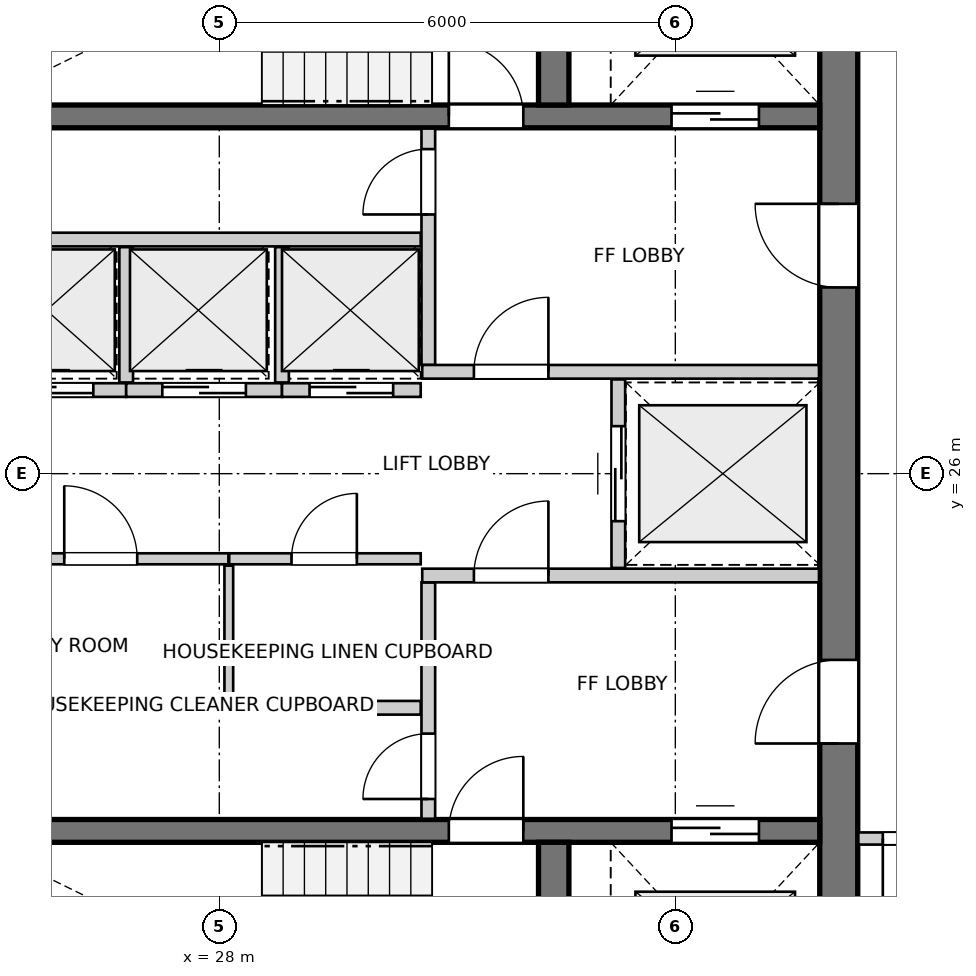
"""IFC4 building model, lengths in metres.
Left out: names, types, materials, properties, quantities, classifications, styles, units other than length and angle.
Written with IfcOpenShell. Run it as: python <this file> out.ifc"""

import sys

from ifc_helpers import new_model, si_unit, direction, frame, frame_2d, origin, place, context, subcontext, project, spatial, rectangle, extrude, source, transform, mapped, element, fill, save


model = new_model("IFC4")
c1 = context("Model", 3, precision=1e-05, world=origin(), true_north=direction((0.0, 1.0)))
c2 = subcontext(c1, "Body", "Model", "MODEL_VIEW")
j1 = project(units=[si_unit("LENGTHUNIT", "METRE"), si_unit("PLANEANGLEUNIT", "RADIAN")], contexts=[c1])
p1 = place(None, origin())
s1 = spatial("IfcSite", under=j1, at=p1, CompositionType="ELEMENT")
p2 = place(p1, origin())
s2 = spatial("IfcBuilding", under=s1, at=p2, CompositionType="ELEMENT")
p3 = place(p2, frame((0.0, 0.0, 224.4)))
s3 = spatial("IfcBuildingStorey", under=s2, at=p3, CompositionType="ELEMENT", Elevation=224.4)
p4 = place(p3, frame((36.15, 18.2, 0.0), z_axis=(0.0, 0.0, 1.0), x_axis=(0.0, 1.0, 0.0)))
e1 = element("IfcWall", 1, at=p4, inside=s3, PredefinedType="SHEAR", context=c2, shape_type="SweptSolid", body=[
    extrude(rectangle(XDim=15.6, YDim=0.5, at=frame_2d((7.8, 0.0))), origin(), (0.0, 0.0, 1.0), 2.96),
])
p5 = place(p4, frame((4.25, 0.0, 0.0)))
e2 = element("IfcOpeningElement", 2, at=p5, cuts=e1, PredefinedType="OPENING", context=c2, shape_type="SweptSolid", body=[
    extrude(rectangle(XDim=1.1, YDim=2.15, at=frame_2d((0.55, 1.075))), frame((0.0, 0.26, 0.0), z_axis=(0.0, -1.0, 0.0), x_axis=(1.0, 0.0, 0.0)), (0.0, 0.0, 1.0), 0.52),
])
p6 = place(p4, frame((10.25, 0.0, 0.0)))
e3 = element("IfcOpeningElement", 3, at=p6, cuts=e1, PredefinedType="OPENING", context=c2, shape_type="SweptSolid", body=[
    extrude(rectangle(XDim=1.1, YDim=2.15, at=frame_2d((0.55, 1.075))), frame((0.0, 0.26, 0.0), z_axis=(0.0, -1.0, 0.0), x_axis=(1.0, 0.0, 0.0)), (0.0, 0.0, 1.0), 0.52),
])
p7 = place(p3, frame((24.8, 21.3, 0.0), z_axis=(0.0, 0.0, 1.0), x_axis=(1.0, 0.0, 0.0)))
e4 = element("IfcWall", 4, at=p7, inside=s3, PredefinedType="SHEAR", context=c2, shape_type="SweptSolid", body=[
    extrude(rectangle(XDim=11.1, YDim=0.3, at=frame_2d((5.55, 0.0))), origin(), (0.0, 0.0, 1.0), 2.96),
])
p8 = place(p7, frame((6.22, 0.0, 0.0)))
e5 = element("IfcOpeningElement", 5, at=p8, cuts=e4, PredefinedType="OPENING", context=c2, shape_type="SweptSolid", body=[
    extrude(rectangle(XDim=0.98, YDim=2.15, at=frame_2d((0.49, 1.075))), frame((0.0, 0.16, 0.0), z_axis=(0.0, -1.0, 0.0), x_axis=(1.0, 0.0, 0.0)), (0.0, 0.0, 1.0), 0.32),
])
p9 = place(p7, frame((9.15, 0.0, 0.0)))
e6 = element("IfcOpeningElement", 6, at=p9, cuts=e4, PredefinedType="OPENING", context=c2, shape_type="SweptSolid", body=[
    extrude(rectangle(XDim=1.15, YDim=2.15, at=frame_2d((0.575, 1.075))), frame((0.0, 0.16, 0.0), z_axis=(0.0, -1.0, 0.0), x_axis=(1.0, 0.0, 0.0)), (0.0, 0.0, 1.0), 0.32),
])
p10 = place(p3, frame((32.4, 18.2, 0.0), z_axis=(0.0, 0.0, 1.0), x_axis=(0.0, 1.0, 0.0)))
e7 = element("IfcWall", 7, at=p10, inside=s3, PredefinedType="SHEAR", context=c2, shape_type="SweptSolid", body=[
    extrude(rectangle(XDim=2.95, YDim=0.4, at=frame_2d((1.475, 0.0))), origin(), (0.0, 0.0, 1.0), 2.96),
])
p11 = place(p3, frame((24.8, 30.7, 0.0), z_axis=(0.0, 0.0, 1.0), x_axis=(1.0, 0.0, 0.0)))
e8 = element("IfcWall", 8, at=p11, inside=s3, PredefinedType="SHEAR", context=c2, shape_type="SweptSolid", body=[
    extrude(rectangle(XDim=11.1, YDim=0.3, at=frame_2d((5.55, 0.0))), origin(), (0.0, 0.0, 1.0), 2.96),
])
p12 = place(p11, frame((6.22, 0.0, 0.0)))
e9 = element("IfcOpeningElement", 9, at=p12, cuts=e8, PredefinedType="OPENING", context=c2, shape_type="SweptSolid", body=[
    extrude(rectangle(XDim=0.98, YDim=2.15, at=frame_2d((0.49, 1.075))), frame((0.0, 0.16, 0.0), z_axis=(0.0, -1.0, 0.0), x_axis=(1.0, 0.0, 0.0)), (0.0, 0.0, 1.0), 0.32),
])
p13 = place(p11, frame((9.15, 0.0, 0.0)))
e10 = element("IfcOpeningElement", 10, at=p13, cuts=e8, PredefinedType="OPENING", context=c2, shape_type="SweptSolid", body=[
    extrude(rectangle(XDim=1.15, YDim=2.15, at=frame_2d((0.575, 1.075))), frame((0.0, 0.16, 0.0), z_axis=(0.0, -1.0, 0.0), x_axis=(1.0, 0.0, 0.0)), (0.0, 0.0, 1.0), 0.32),
])
p14 = place(p3, frame((32.4, 30.85, 0.0), z_axis=(0.0, 0.0, 1.0), x_axis=(0.0, 1.0, 0.0)))
e11 = element("IfcWall", 11, at=p14, inside=s3, PredefinedType="SHEAR", context=c2, shape_type="SweptSolid", body=[
    extrude(rectangle(XDim=2.95, YDim=0.4, at=frame_2d((1.475, 0.0))), origin(), (0.0, 0.0, 1.0), 2.96),
])
p15 = place(p3, frame((30.75, 21.46, 0.0), z_axis=(0.0, 0.0, 1.0), x_axis=(0.0, 1.0, 0.0)))
e12 = element("IfcWall", 12, at=p15, inside=s3, PredefinedType="PARTITIONING", context=c2, shape_type="SweptSolid", body=[
    extrude(rectangle(XDim=3.11, YDim=0.18, at=frame_2d((1.555, 0.0))), origin(), (0.0, 0.0, 1.0), 2.96),
])
p16 = place(p15, frame((0.26, 0.0, 0.0)))
e13 = element("IfcOpeningElement", 13, at=p16, cuts=e12, PredefinedType="OPENING", context=c2, shape_type="SweptSolid", body=[
    extrude(rectangle(XDim=0.86, YDim=2.05, at=frame_2d((0.43, 1.025))), frame((0.0, 0.1, 0.0), z_axis=(0.0, -1.0, 0.0), x_axis=(1.0, 0.0, 0.0)), (0.0, 0.0, 1.0), 0.2),
])
p17 = place(p3, frame((30.67, 24.66, 0.0), z_axis=(0.0, 0.0, 1.0), x_axis=(1.0, 0.0, 0.0)))
e14 = element("IfcWall", 14, at=p17, inside=s3, PredefinedType="PARTITIONING", context=c2, shape_type="SweptSolid", body=[
    extrude(rectangle(XDim=5.22, YDim=0.18, at=frame_2d((2.61, 0.0))), origin(), (0.0, 0.0, 1.0), 2.96),
])
p18 = place(p17, frame((0.68, 0.0, 0.0)))
e15 = element("IfcOpeningElement", 15, at=p18, cuts=e14, PredefinedType="OPENING", context=c2, shape_type="SweptSolid", body=[
    extrude(rectangle(XDim=0.98, YDim=2.15, at=frame_2d((0.49, 1.075))), frame((0.0, 0.1, 0.0), z_axis=(0.0, -1.0, 0.0), x_axis=(1.0, 0.0, 0.0)), (0.0, 0.0, 1.0), 0.2),
])
p19 = place(p3, frame((30.75, 27.43, 0.0), z_axis=(0.0, 0.0, 1.0), x_axis=(0.0, 1.0, 0.0)))
e16 = element("IfcWall", 16, at=p19, inside=s3, PredefinedType="PARTITIONING", context=c2, shape_type="SweptSolid", body=[
    extrude(rectangle(XDim=3.11, YDim=0.18, at=frame_2d((1.555, 0.0))), origin(), (0.0, 0.0, 1.0), 2.96),
])
p20 = place(p19, frame((1.98, 0.0, 0.0)))
e17 = element("IfcOpeningElement", 17, at=p20, cuts=e16, PredefinedType="OPENING", context=c2, shape_type="SweptSolid", body=[
    extrude(rectangle(XDim=0.86, YDim=2.05, at=frame_2d((0.43, 1.025))), frame((0.0, 0.1, 0.0), z_axis=(0.0, -1.0, 0.0), x_axis=(1.0, 0.0, 0.0)), (0.0, 0.0, 1.0), 0.2),
])
p21 = place(p3, frame((30.67, 27.34, 0.0), z_axis=(0.0, 0.0, 1.0), x_axis=(1.0, 0.0, 0.0)))
e18 = element("IfcWall", 18, at=p21, inside=s3, PredefinedType="PARTITIONING", context=c2, shape_type="SweptSolid", body=[
    extrude(rectangle(XDim=5.22, YDim=0.18, at=frame_2d((2.61, 0.0))), origin(), (0.0, 0.0, 1.0), 2.96),
])
p22 = place(p21, frame((0.68, 0.0, 0.0)))
e19 = element("IfcOpeningElement", 19, at=p22, cuts=e18, PredefinedType="OPENING", context=c2, shape_type="SweptSolid", body=[
    extrude(rectangle(XDim=0.98, YDim=2.15, at=frame_2d((0.49, 1.075))), frame((0.0, 0.1, 0.0), z_axis=(0.0, -1.0, 0.0), x_axis=(1.0, 0.0, 0.0)), (0.0, 0.0, 1.0), 0.2),
])
p23 = place(p3, frame((33.25, 24.76, 0.0), z_axis=(0.0, 0.0, 1.0), x_axis=(0.0, 1.0, 0.0)))
e20 = element("IfcWall", 20, at=p23, inside=s3, PredefinedType="PARTITIONING", context=c2, shape_type="SweptSolid", body=[
    extrude(rectangle(XDim=2.48, YDim=0.18, at=frame_2d((1.24, 0.0))), origin(), (0.0, 0.0, 1.0), 2.96),
])
p24 = place(p23, frame((0.615, 0.0, 0.0)))
e21 = element("IfcOpeningElement", 21, at=p24, cuts=e20, PredefinedType="OPENING", context=c2, shape_type="SweptSolid", body=[
    extrude(rectangle(XDim=1.25, YDim=2.15, at=frame_2d((0.625, 1.075))), frame((0.0, 0.1, 0.0), z_axis=(0.0, -1.0, 0.0), x_axis=(1.0, 0.0, 0.0)), (0.0, 0.0, 1.0), 0.2),
])
p25 = place(p3, frame((24.81, 22.92, 0.0), z_axis=(0.0, 0.0, 1.0), x_axis=(1.0, 0.0, 0.0)))
e22 = element("IfcWall", 22, at=p25, inside=s3, PredefinedType="PARTITIONING", context=c2, shape_type="SweptSolid", body=[
    extrude(rectangle(XDim=5.84, YDim=0.18, at=frame_2d((2.92, 0.0))), origin(), (0.0, 0.0, 1.0), 2.96),
])
p26 = place(p3, frame((24.81, 24.88, 0.0), z_axis=(0.0, 0.0, 1.0), x_axis=(1.0, 0.0, 0.0)))
e23 = element("IfcWall", 23, at=p26, inside=s3, PredefinedType="PARTITIONING", context=c2, shape_type="SweptSolid", body=[
    extrude(rectangle(XDim=3.31, YDim=0.145, at=frame_2d((1.655, 0.0))), origin(), (0.0, 0.0, 1.0), 2.96),
])
p27 = place(p26, frame((1.15, 0.0, 0.0)))
e24 = element("IfcOpeningElement", 24, at=p27, cuts=e23, PredefinedType="OPENING", context=c2, shape_type="SweptSolid", body=[
    extrude(rectangle(XDim=0.96, YDim=2.1, at=frame_2d((0.48, 1.05))), frame((0.0, 0.083, 0.0), z_axis=(0.0, -1.0, 0.0), x_axis=(1.0, 0.0, 0.0)), (0.0, 0.0, 1.0), 0.165),
])
p28 = place(p3, frame((28.13, 24.88, 0.0), z_axis=(0.0, 0.0, 1.0), x_axis=(1.0, 0.0, 0.0)))
e25 = element("IfcWall", 25, at=p28, inside=s3, PredefinedType="PARTITIONING", context=c2, shape_type="SweptSolid", body=[
    extrude(rectangle(XDim=2.52, YDim=0.145, at=frame_2d((1.26, 0.0))), origin(), (0.0, 0.0, 1.0), 2.96),
])
p29 = place(p28, frame((0.82, 0.0, 0.0)))
e26 = element("IfcOpeningElement", 26, at=p29, cuts=e25, PredefinedType="OPENING", context=c2, shape_type="SweptSolid", body=[
    extrude(rectangle(XDim=0.86, YDim=2.05, at=frame_2d((0.43, 1.025))), frame((0.0, 0.083, 0.0), z_axis=(0.0, -1.0, 0.0), x_axis=(1.0, 0.0, 0.0)), (0.0, 0.0, 1.0), 0.165),
])
p30 = place(p3, frame((28.125, 23.02, 0.0), z_axis=(0.0, 0.0, 1.0), x_axis=(0.0, 1.0, 0.0)))
e27 = element("IfcWall", 27, at=p30, inside=s3, PredefinedType="PARTITIONING", context=c2, shape_type="SweptSolid", body=[
    extrude(rectangle(XDim=1.77, YDim=0.115, at=frame_2d((0.885, 0.0))), origin(), (0.0, 0.0, 1.0), 2.96),
])
p31 = place(p3, frame((24.81, 29.08, 0.0), z_axis=(0.0, 0.0, 1.0), x_axis=(1.0, 0.0, 0.0)))
e28 = element("IfcWall", 28, at=p31, inside=s3, PredefinedType="PARTITIONING", context=c2, shape_type="SweptSolid", body=[
    extrude(rectangle(XDim=5.84, YDim=0.18, at=frame_2d((2.92, 0.0))), origin(), (0.0, 0.0, 1.0), 2.96),
])
p32 = place(p3, frame((24.81, 27.1, 0.0), z_axis=(0.0, 0.0, 1.0), x_axis=(1.0, 0.0, 0.0)))
e29 = element("IfcWall", 29, at=p32, inside=s3, PredefinedType="PARTITIONING", context=c2, shape_type="SweptSolid", body=[
    extrude(rectangle(XDim=1.965, YDim=0.18, at=frame_2d((0.982, 0.0))), origin(), (0.0, 0.0, 1.0), 2.96),
])
p33 = place(p32, frame((0.433, 0.0, 0.0)))
e30 = element("IfcOpeningElement", 30, at=p33, cuts=e29, PredefinedType="OPENING", context=c2, shape_type="SweptSolid", body=[
    extrude(rectangle(XDim=1.1, YDim=2.15, at=frame_2d((0.55, 1.075))), frame((0.0, 0.1, 0.0), z_axis=(0.0, -1.0, 0.0), x_axis=(1.0, 0.0, 0.0)), (0.0, 0.0, 1.0), 0.2),
])
p34 = place(p3, frame((26.775, 27.1, 0.0), z_axis=(0.0, 0.0, 1.0), x_axis=(1.0, 0.0, 0.0)))
e31 = element("IfcWall", 31, at=p34, inside=s3, PredefinedType="PARTITIONING", context=c2, shape_type="SweptSolid", body=[
    extrude(rectangle(XDim=2.05, YDim=0.18, at=frame_2d((1.025, 0.0))), origin(), (0.0, 0.0, 1.0), 2.96),
])
p35 = place(p34, frame((0.475, 0.0, 0.0)))
e32 = element("IfcOpeningElement", 32, at=p35, cuts=e31, PredefinedType="OPENING", context=c2, shape_type="SweptSolid", body=[
    extrude(rectangle(XDim=1.1, YDim=2.15, at=frame_2d((0.55, 1.075))), frame((0.0, 0.1, 0.0), z_axis=(0.0, -1.0, 0.0), x_axis=(1.0, 0.0, 0.0)), (0.0, 0.0, 1.0), 0.2),
])
p36 = place(p3, frame((26.775, 27.2, 0.0), z_axis=(0.0, 0.0, 1.0), x_axis=(0.0, 1.0, 0.0)))
e33 = element("IfcWall", 33, at=p36, inside=s3, PredefinedType="PARTITIONING", context=c2, shape_type="SweptSolid", body=[
    extrude(rectangle(XDim=1.78, YDim=0.18, at=frame_2d((0.89, 0.0))), origin(), (0.0, 0.0, 1.0), 2.96),
])
p37 = place(p3, frame((28.825, 27.1, 0.0), z_axis=(0.0, 0.0, 1.0), x_axis=(1.0, 0.0, 0.0)))
e34 = element("IfcWall", 34, at=p37, inside=s3, PredefinedType="PARTITIONING", context=c2, shape_type="SweptSolid", body=[
    extrude(rectangle(XDim=1.825, YDim=0.18, at=frame_2d((0.913, 0.0))), origin(), (0.0, 0.0, 1.0), 2.96),
])
p38 = place(p37, frame((0.363, 0.0, 0.0)))
e35 = element("IfcOpeningElement", 35, at=p38, cuts=e34, PredefinedType="OPENING", context=c2, shape_type="SweptSolid", body=[
    extrude(rectangle(XDim=1.1, YDim=2.15, at=frame_2d((0.55, 1.075))), frame((0.0, 0.1, 0.0), z_axis=(0.0, -1.0, 0.0), x_axis=(1.0, 0.0, 0.0)), (0.0, 0.0, 1.0), 0.2),
])
p39 = place(p3, frame((28.825, 27.2, 0.0), z_axis=(0.0, 0.0, 1.0), x_axis=(0.0, 1.0, 0.0)))
e36 = element("IfcWall", 36, at=p39, inside=s3, PredefinedType="PARTITIONING", context=c2, shape_type="SweptSolid", body=[
    extrude(rectangle(XDim=1.78, YDim=0.18, at=frame_2d((0.89, 0.0))), origin(), (0.0, 0.0, 1.0), 2.96),
])
p40 = place(p3, frame((38.02, 21.2, 0.0), z_axis=(0.0, 0.0, 1.0), x_axis=(-1.0, 0.0, 0.0)))
e37 = element("IfcWall", 37, at=p40, inside=s3, PredefinedType="PARTITIONING", context=c2, shape_type="SweptSolid", body=[
    extrude(rectangle(XDim=1.612, YDim=0.16, at=frame_2d((0.806, 0.0))), origin(), (0.0, 0.0, 1.0), 2.96),
])
p41 = place(p40, frame((0.33, 0.0, 0.0)))
e38 = element("IfcOpeningElement", 38, at=p41, cuts=e37, PredefinedType="OPENING", context=c2, shape_type="SweptSolid", body=[
    extrude(rectangle(XDim=0.96, YDim=2.1, at=frame_2d((0.48, 1.05))), frame((0.0, 0.09, 0.0), z_axis=(0.0, -1.0, 0.0), x_axis=(1.0, 0.0, 0.0)), (0.0, 0.0, 1.0), 0.18),
])
m1 = source(origin(), c2, "Body", "SweptSolid", [
    extrude(rectangle(XDim=0.98, YDim=2.15, at=frame_2d((0.49, 1.075))), frame((0.0, 0.025, 0.0), z_axis=(0.0, -1.0, 0.0), x_axis=(1.0, 0.0, 0.0)), (0.0, 0.0, 1.0), 0.05),
])
p42 = place(p8, origin())
e39 = element("IfcDoor", 39, at=p42, inside=s3, OperationType="SINGLE_SWING_RIGHT", PredefinedType="DOOR", context=c2, shape_type="MappedRepresentation", body=[
    mapped(m1, transform((0.0, 0.0, 0.0), x_axis=(1.0, 0.0, 0.0), y_axis=(0.0, 1.0, 0.0), z_axis=(0.0, 0.0, 1.0), scale=1.0)),
])
fill(e5, e39)
m2 = source(origin(), c2, "Body", "SweptSolid", [
    extrude(rectangle(XDim=1.15, YDim=2.15, at=frame_2d((0.575, 1.075))), frame((0.0, 0.025, 0.0), z_axis=(0.0, -1.0, 0.0), x_axis=(1.0, 0.0, 0.0)), (0.0, 0.0, 1.0), 0.05),
])
p43 = place(p9, origin())
e40 = element("IfcDoor", 40, at=p43, inside=s3, OperationType="DOUBLE_DOOR_SLIDING", PredefinedType="DOOR", context=c2, shape_type="MappedRepresentation", body=[
    mapped(m2, transform((0.0, 0.0, 0.0), x_axis=(1.0, 0.0, 0.0), y_axis=(0.0, 1.0, 0.0), z_axis=(0.0, 0.0, 1.0), scale=1.0)),
])
fill(e6, e40)
p44 = place(p12, origin())
e41 = element("IfcDoor", 41, at=p44, inside=s3, OperationType="SINGLE_SWING_LEFT", PredefinedType="DOOR", context=c2, shape_type="MappedRepresentation", body=[
    mapped(m1, transform((0.0, 0.0, 0.0), x_axis=(1.0, 0.0, 0.0), y_axis=(0.0, 1.0, 0.0), z_axis=(0.0, 0.0, 1.0), scale=1.0)),
])
fill(e9, e41)
p45 = place(p13, origin())
e42 = element("IfcDoor", 42, at=p45, inside=s3, OperationType="DOUBLE_DOOR_SLIDING", PredefinedType="DOOR", context=c2, shape_type="MappedRepresentation", body=[
    mapped(m2, transform((0.0, 0.0, 0.0), x_axis=(1.0, 0.0, 0.0), y_axis=(0.0, 1.0, 0.0), z_axis=(0.0, 0.0, 1.0), scale=1.0)),
])
fill(e10, e42)
m3 = source(origin(), c2, "Body", "SweptSolid", [
    extrude(rectangle(XDim=1.1, YDim=2.15, at=frame_2d((0.55, 1.075))), frame((0.0, 0.025, 0.0), z_axis=(0.0, -1.0, 0.0), x_axis=(1.0, 0.0, 0.0)), (0.0, 0.0, 1.0), 0.05),
])
p46 = place(p5, origin())
e43 = element("IfcDoor", 43, at=p46, inside=s3, OperationType="SINGLE_SWING_LEFT", PredefinedType="DOOR", context=c2, shape_type="MappedRepresentation", body=[
    mapped(m3, transform((0.0, 0.0, 0.0), x_axis=(1.0, 0.0, 0.0), y_axis=(0.0, 1.0, 0.0), z_axis=(0.0, 0.0, 1.0), scale=1.0)),
])
fill(e2, e43)
p47 = place(p6, origin())
e44 = element("IfcDoor", 44, at=p47, inside=s3, OperationType="SINGLE_SWING_RIGHT", PredefinedType="DOOR", context=c2, shape_type="MappedRepresentation", body=[
    mapped(m3, transform((0.0, 0.0, 0.0), x_axis=(1.0, 0.0, 0.0), y_axis=(0.0, 1.0, 0.0), z_axis=(0.0, 0.0, 1.0), scale=1.0)),
])
fill(e3, e44)
m4 = source(origin(), c2, "Body", "SweptSolid", [
    extrude(rectangle(XDim=0.86, YDim=2.05, at=frame_2d((0.43, 1.025))), frame((0.0, 0.025, 0.0), z_axis=(0.0, -1.0, 0.0), x_axis=(1.0, 0.0, 0.0)), (0.0, 0.0, 1.0), 0.05),
])
p48 = place(p16, origin())
e45 = element("IfcDoor", 45, at=p48, inside=s3, OperationType="SINGLE_SWING_LEFT", PredefinedType="DOOR", context=c2, shape_type="MappedRepresentation", body=[
    mapped(m4, transform((0.0, 0.0, 0.0), x_axis=(1.0, 0.0, 0.0), y_axis=(0.0, 1.0, 0.0), z_axis=(0.0, 0.0, 1.0), scale=1.0)),
])
fill(e13, e45)
p49 = place(p18, origin())
e46 = element("IfcDoor", 46, at=p49, inside=s3, OperationType="SINGLE_SWING_RIGHT", PredefinedType="DOOR", context=c2, shape_type="MappedRepresentation", body=[
    mapped(m1, transform((0.0, 0.0, 0.0), x_axis=(1.0, 0.0, 0.0), y_axis=(0.0, 1.0, 0.0), z_axis=(0.0, 0.0, 1.0), scale=1.0)),
])
fill(e15, e46)
p50 = place(p20, origin())
e47 = element("IfcDoor", 47, at=p50, inside=s3, OperationType="SINGLE_SWING_LEFT", PredefinedType="DOOR", context=c2, shape_type="MappedRepresentation", body=[
    mapped(m4, transform((0.0, 0.0, 0.0), x_axis=(1.0, 0.0, 0.0), y_axis=(0.0, 1.0, 0.0), z_axis=(0.0, 0.0, 1.0), scale=1.0)),
])
fill(e17, e47)
p51 = place(p22, origin())
e48 = element("IfcDoor", 48, at=p51, inside=s3, OperationType="SINGLE_SWING_RIGHT", PredefinedType="DOOR", context=c2, shape_type="MappedRepresentation", body=[
    mapped(m1, transform((0.0, 0.0, 0.0), x_axis=(1.0, 0.0, 0.0), y_axis=(0.0, 1.0, 0.0), z_axis=(0.0, 0.0, 1.0), scale=1.0)),
])
fill(e19, e48)
m5 = source(origin(), c2, "Body", "SweptSolid", [
    extrude(rectangle(XDim=1.25, YDim=2.15, at=frame_2d((0.625, 1.075))), frame((0.0, 0.025, 0.0), z_axis=(0.0, -1.0, 0.0), x_axis=(1.0, 0.0, 0.0)), (0.0, 0.0, 1.0), 0.05),
])
p52 = place(p24, origin())
e49 = element("IfcDoor", 49, at=p52, inside=s3, OperationType="DOUBLE_DOOR_SLIDING", PredefinedType="DOOR", context=c2, shape_type="MappedRepresentation", body=[
    mapped(m5, transform((0.0, 0.0, 0.0), x_axis=(1.0, 0.0, 0.0), y_axis=(0.0, 1.0, 0.0), z_axis=(0.0, 0.0, 1.0), scale=1.0)),
])
fill(e21, e49)
m6 = source(origin(), c2, "Body", "SweptSolid", [
    extrude(rectangle(XDim=0.96, YDim=2.1, at=frame_2d((0.48, 1.05))), frame((0.0, 0.025, 0.0), z_axis=(0.0, -1.0, 0.0), x_axis=(1.0, 0.0, 0.0)), (0.0, 0.0, 1.0), 0.05),
])
p53 = place(p27, origin())
e50 = element("IfcDoor", 50, at=p53, inside=s3, OperationType="SINGLE_SWING_LEFT", PredefinedType="DOOR", context=c2, shape_type="MappedRepresentation", body=[
    mapped(m6, transform((0.0, 0.0, 0.0), x_axis=(1.0, 0.0, 0.0), y_axis=(0.0, 1.0, 0.0), z_axis=(0.0, 0.0, 1.0), scale=1.0)),
])
fill(e24, e50)
p54 = place(p29, origin())
e51 = element("IfcDoor", 51, at=p54, inside=s3, OperationType="SINGLE_SWING_RIGHT", PredefinedType="DOOR", context=c2, shape_type="MappedRepresentation", body=[
    mapped(m4, transform((0.0, 0.0, 0.0), x_axis=(1.0, 0.0, 0.0), y_axis=(0.0, 1.0, 0.0), z_axis=(0.0, 0.0, 1.0), scale=1.0)),
])
fill(e26, e51)
p55 = place(p33, origin())
e52 = element("IfcDoor", 52, at=p55, inside=s3, OperationType="DOUBLE_DOOR_SLIDING", PredefinedType="DOOR", context=c2, shape_type="MappedRepresentation", body=[
    mapped(m3, transform((0.0, 0.0, 0.0), x_axis=(1.0, 0.0, 0.0), y_axis=(0.0, 1.0, 0.0), z_axis=(0.0, 0.0, 1.0), scale=1.0)),
])
fill(e30, e52)
p56 = place(p35, origin())
e53 = element("IfcDoor", 53, at=p56, inside=s3, OperationType="DOUBLE_DOOR_SLIDING", PredefinedType="DOOR", context=c2, shape_type="MappedRepresentation", body=[
    mapped(m3, transform((0.0, 0.0, 0.0), x_axis=(1.0, 0.0, 0.0), y_axis=(0.0, 1.0, 0.0), z_axis=(0.0, 0.0, 1.0), scale=1.0)),
])
fill(e32, e53)
p57 = place(p38, origin())
e54 = element("IfcDoor", 54, at=p57, inside=s3, OperationType="DOUBLE_DOOR_SLIDING", PredefinedType="DOOR", context=c2, shape_type="MappedRepresentation", body=[
    mapped(m3, transform((0.0, 0.0, 0.0), x_axis=(1.0, 0.0, 0.0), y_axis=(0.0, 1.0, 0.0), z_axis=(0.0, 0.0, 1.0), scale=1.0)),
])
fill(e35, e54)
p58 = place(p41, origin())
e55 = element("IfcDoor", 55, at=p58, inside=s3, OperationType="SINGLE_SWING_RIGHT", PredefinedType="DOOR", context=c2, shape_type="MappedRepresentation", body=[
    mapped(m6, transform((0.0, 0.0, 0.0), x_axis=(1.0, 0.0, 0.0), y_axis=(0.0, 1.0, 0.0), z_axis=(0.0, 0.0, 1.0), scale=1.0)),
])
fill(e38, e55)
save(model, sys.argv[1])
